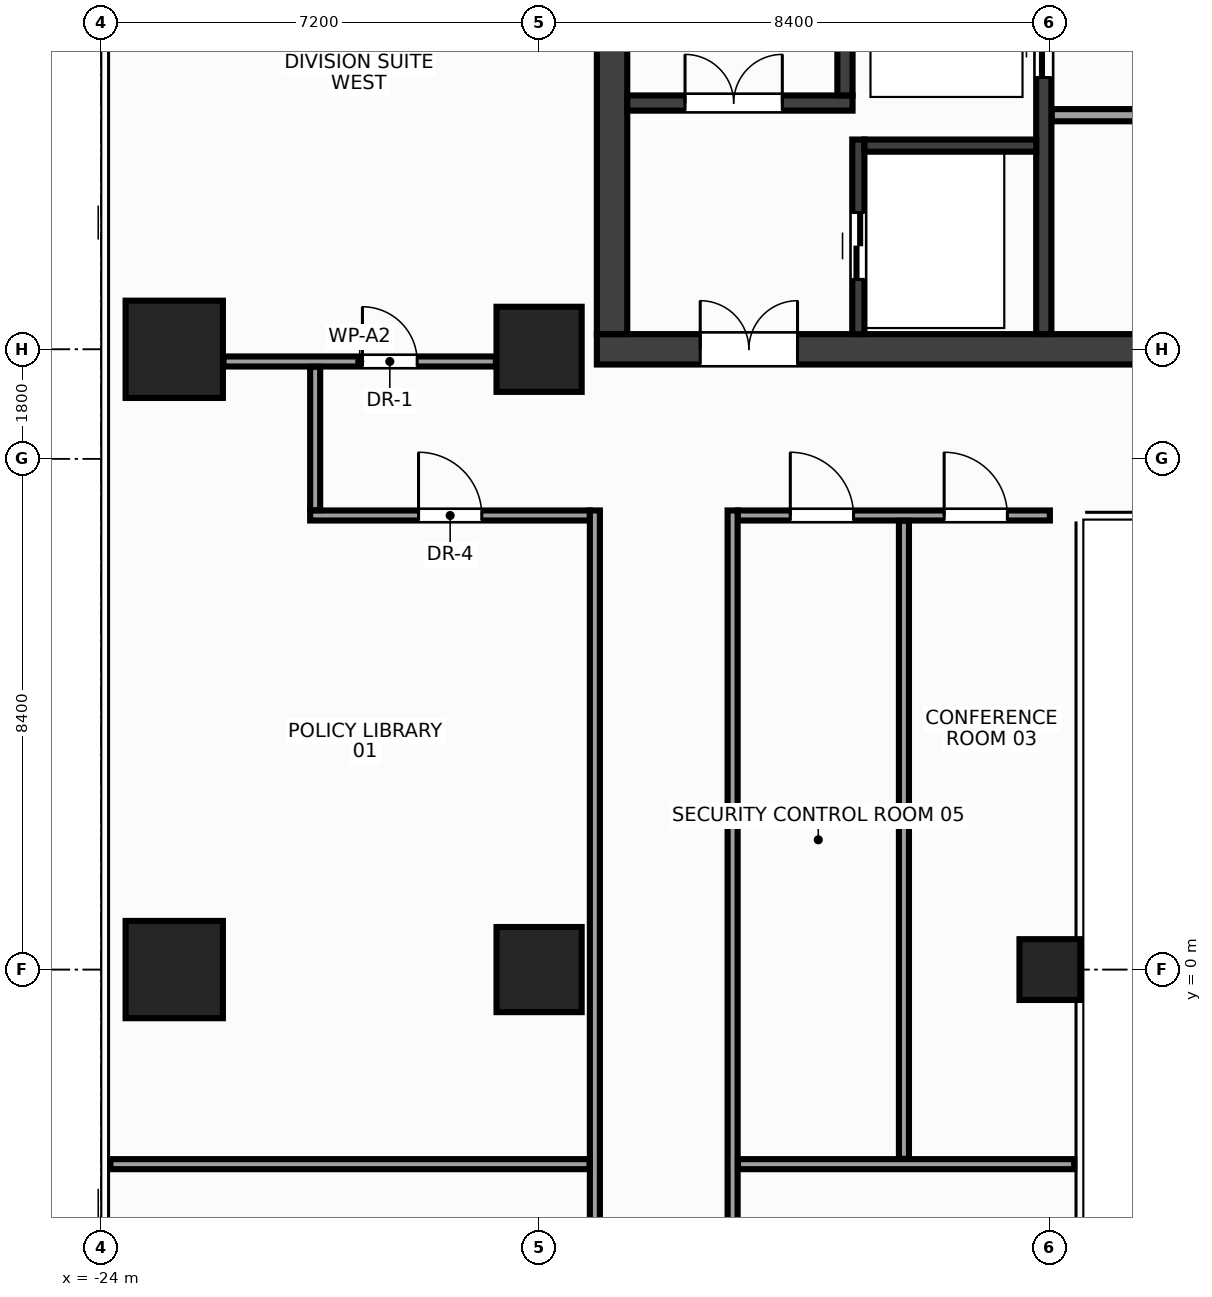
"""IFC4 building model, lengths in metres.
Left out: names, types, materials, properties, quantities, classifications, styles, units other than length and angle.
Written with IfcOpenShell. Run it as: python <this file> out.ifc"""

import sys

from ifc_helpers import new_model, si_unit, direction, frame, frame_2d, origin, origin_2d, place, context, subcontext, project, spatial, rectangle, hollow_rectangle, extrude, source, transform, mapped, element, fill, save


model = new_model("IFC4")
c1 = context("Model", 3, precision=1e-05, world=origin(), true_north=direction((0.0, 1.0)))
c2 = subcontext(c1, "Body", "Model", "MODEL_VIEW")
j1 = project(units=[si_unit("LENGTHUNIT", "METRE"), si_unit("PLANEANGLEUNIT", "RADIAN")], contexts=[c1])
p1 = place(None, origin())
s1 = spatial("IfcSite", under=j1, at=p1, CompositionType="ELEMENT")
p2 = place(p1, origin())
s2 = spatial("IfcBuilding", under=s1, at=p2, CompositionType="ELEMENT")
p3 = place(p2, frame((0.0, 0.0, 221.6)))
s3 = spatial("IfcBuildingStorey", under=s2, at=p3, CompositionType="ELEMENT", Elevation=221.6)
m1 = source(origin(), c2, "Body", "SweptSolid", [
    extrude(rectangle(XDim=31.7, YDim=0.5, at=frame_2d((15.85, 0.0))), origin(), (0.0, 0.0, 1.0), 3.6),
])
p4 = place(p3, frame((-15.85, 10.2, 0.0), z_axis=(0.0, 0.0, 1.0), x_axis=(1.0, 0.0, 0.0)))
e1 = element("IfcWall", 1, at=p4, inside=s3, PredefinedType="SHEAR", context=c2, shape_type="MappedRepresentation", body=[
    mapped(m1, transform((0.0, 0.0, 0.0), x_axis=(1.0, 0.0, 0.0), y_axis=(0.0, 1.0, 0.0), z_axis=(0.0, 0.0, 1.0), scale=1.0)),
])
p5 = place(p4, frame((1.7, 0.0, 0.0)))
e2 = element("IfcOpeningElement", 2, at=p5, cuts=e1, PredefinedType="OPENING", context=c2, shape_type="SweptSolid", body=[
    extrude(rectangle(XDim=1.6, YDim=2.15, at=frame_2d((0.8, 1.075))), frame((0.0, 0.262, 0.0), z_axis=(0.0, -1.0, 0.0), x_axis=(1.0, 0.0, 0.0)), (0.0, 0.0, 1.0), 0.524),
])
p6 = place(p4, frame((28.4, 0.0, 0.0)))
e3 = element("IfcOpeningElement", 3, at=p6, cuts=e1, PredefinedType="OPENING", context=c2, shape_type="SweptSolid", body=[
    extrude(rectangle(XDim=1.6, YDim=2.15, at=frame_2d((0.8, 1.075))), frame((0.0, 0.262, 0.0), z_axis=(0.0, -1.0, 0.0), x_axis=(1.0, 0.0, 0.0)), (0.0, 0.0, 1.0), 0.524),
])
p7 = place(p4, frame((15.1, 0.0, 0.0)))
e4 = element("IfcOpeningElement", 4, at=p7, cuts=e1, PredefinedType="OPENING", context=c2, shape_type="SweptSolid", body=[
    extrude(rectangle(XDim=1.5, YDim=2.2, at=frame_2d((0.75, 1.1))), frame((0.0, 0.262, 0.0), z_axis=(0.0, -1.0, 0.0), x_axis=(1.0, 0.0, 0.0)), (0.0, 0.0, 1.0), 0.524),
])
m2 = source(origin(), c2, "Body", "SweptSolid", [
    extrude(rectangle(XDim=13.1, YDim=0.5, at=frame_2d((6.55, 0.0))), origin(), (0.0, 0.0, 1.0), 3.6),
])
p8 = place(p3, frame((-15.6, 10.45, 0.0), z_axis=(0.0, 0.0, 1.0), x_axis=(0.0, 1.0, 0.0)))
e5 = element("IfcWall", 5, at=p8, inside=s3, PredefinedType="SHEAR", context=c2, shape_type="MappedRepresentation", body=[
    mapped(m2, transform((0.0, 0.0, 0.0), x_axis=(1.0, 0.0, 0.0), y_axis=(0.0, 1.0, 0.0), z_axis=(0.0, 0.0, 1.0), scale=1.0)),
])
m3 = source(origin(), c2, "Body", "SweptSolid", [
    extrude(rectangle(XDim=13.1, YDim=0.25, at=frame_2d((6.55, 0.0))), origin(), (0.0, 0.0, 1.0), 3.6),
])
p9 = place(p3, frame((-8.5, 10.45, 0.0), z_axis=(0.0, 0.0, 1.0), x_axis=(0.0, 1.0, 0.0)))
e6 = element("IfcWall", 6, at=p9, inside=s3, PredefinedType="SHEAR", context=c2, shape_type="MappedRepresentation", body=[
    mapped(m3, transform((0.0, 0.0, 0.0), x_axis=(1.0, 0.0, 0.0), y_axis=(0.0, 1.0, 0.0), z_axis=(0.0, 0.0, 1.0), scale=1.0)),
])
p10 = place(p9, frame((4.22, 0.0, 0.0)))
e7 = element("IfcOpeningElement", 7, at=p10, cuts=e6, PredefinedType="OPENING", context=c2, shape_type="SweptSolid", body=[
    extrude(rectangle(XDim=1.1, YDim=2.15, at=frame_2d((0.55, 1.075))), frame((0.0, 0.137, 0.0), z_axis=(0.0, -1.0, 0.0), x_axis=(1.0, 0.0, 0.0)), (0.0, 0.0, 1.0), 0.274),
])
p11 = place(p9, frame((6.14, 0.0, 0.0)))
e8 = element("IfcOpeningElement", 8, at=p11, cuts=e6, PredefinedType="OPENING", context=c2, shape_type="SweptSolid", body=[
    extrude(rectangle(XDim=1.1, YDim=2.15, at=frame_2d((0.55, 1.075))), frame((0.0, 0.137, 0.0), z_axis=(0.0, -1.0, 0.0), x_axis=(1.0, 0.0, 0.0)), (0.0, 0.0, 1.0), 0.274),
])
p12 = place(p9, frame((8.06, 0.0, 0.0)))
e9 = element("IfcOpeningElement", 9, at=p12, cuts=e6, PredefinedType="OPENING", context=c2, shape_type="SweptSolid", body=[
    extrude(rectangle(XDim=1.1, YDim=2.15, at=frame_2d((0.55, 1.075))), frame((0.0, 0.137, 0.0), z_axis=(0.0, -1.0, 0.0), x_axis=(1.0, 0.0, 0.0)), (0.0, 0.0, 1.0), 0.274),
])
m4 = source(origin(), c2, "Body", "SweptSolid", [
    extrude(rectangle(XDim=3.705, YDim=0.25, at=frame_2d((1.853, 0.0))), origin(), (0.0, 0.0, 1.0), 3.6),
])
p13 = place(p3, frame((-15.35, 14.25, 0.0), z_axis=(0.0, 0.0, 1.0), x_axis=(1.0, 0.0, 0.0)))
e10 = element("IfcWall", 10, at=p13, inside=s3, PredefinedType="SHEAR", context=c2, shape_type="MappedRepresentation", body=[
    mapped(m4, transform((0.0, 0.0, 0.0), x_axis=(1.0, 0.0, 0.0), y_axis=(0.0, 1.0, 0.0), z_axis=(0.0, 0.0, 1.0), scale=1.0)),
])
p14 = place(p13, frame((0.95, 0.0, 0.0)))
e11 = element("IfcOpeningElement", 11, at=p14, cuts=e10, PredefinedType="OPENING", context=c2, shape_type="SweptSolid", body=[
    extrude(rectangle(XDim=1.6, YDim=2.15, at=frame_2d((0.8, 1.075))), frame((0.0, 0.137, 0.0), z_axis=(0.0, -1.0, 0.0), x_axis=(1.0, 0.0, 0.0)), (0.0, 0.0, 1.0), 0.274),
])
m5 = source(origin(), c2, "Body", "SweptSolid", [
    extrude(rectangle(XDim=9.175, YDim=0.25, at=frame_2d((4.587, 0.0))), origin(), (0.0, 0.0, 1.0), 3.6),
])
p15 = place(p3, frame((-11.77, 14.375, 0.0), z_axis=(0.0, 0.0, 1.0), x_axis=(0.0, 1.0, 0.0)))
e12 = element("IfcWall", 12, at=p15, inside=s3, PredefinedType="SHEAR", context=c2, shape_type="MappedRepresentation", body=[
    mapped(m5, transform((0.0, 0.0, 0.0), x_axis=(1.0, 0.0, 0.0), y_axis=(0.0, 1.0, 0.0), z_axis=(0.0, 0.0, 1.0), scale=1.0)),
])
m6 = source(origin(), c2, "Body", "SweptSolid", [
    extrude(rectangle(XDim=3.2, YDim=0.2, at=frame_2d((1.6, 0.0))), origin(), (0.0, 0.0, 1.0), 3.6),
])
p16 = place(p3, frame((-11.55, 10.45, 0.0), z_axis=(0.0, 0.0, 1.0), x_axis=(0.0, 1.0, 0.0)))
e13 = element("IfcWall", 13, at=p16, inside=s3, PredefinedType="SHEAR", context=c2, shape_type="MappedRepresentation", body=[
    mapped(m6, transform((0.0, 0.0, 0.0), x_axis=(1.0, 0.0, 0.0), y_axis=(0.0, 1.0, 0.0), z_axis=(0.0, 0.0, 1.0), scale=1.0)),
])
p17 = place(p16, frame((0.9, 0.0, 0.0)))
e14 = element("IfcOpeningElement", 14, at=p17, cuts=e13, PredefinedType="OPENING", context=c2, shape_type="SweptSolid", body=[
    extrude(rectangle(XDim=1.1, YDim=2.15, at=frame_2d((0.55, 1.075))), frame((0.0, 0.112, 0.0), z_axis=(0.0, -1.0, 0.0), x_axis=(1.0, 0.0, 0.0)), (0.0, 0.0, 1.0), 0.224),
])
m7 = source(origin(), c2, "Body", "SweptSolid", [
    extrude(rectangle(XDim=2.825, YDim=0.2, at=frame_2d((1.413, 0.0))), origin(), (0.0, 0.0, 1.0), 3.6),
])
p18 = place(p3, frame((-11.45, 13.55, 0.0), z_axis=(0.0, 0.0, 1.0), x_axis=(1.0, 0.0, 0.0)))
e15 = element("IfcWall", 15, at=p18, inside=s3, PredefinedType="SHEAR", context=c2, shape_type="MappedRepresentation", body=[
    mapped(m7, transform((0.0, 0.0, 0.0), x_axis=(1.0, 0.0, 0.0), y_axis=(0.0, 1.0, 0.0), z_axis=(0.0, 0.0, 1.0), scale=1.0)),
])
m8 = source(origin(), c2, "Body", "SweptSolid", [
    extrude(rectangle(XDim=1.4, YDim=1.4, at=origin_2d()), origin(), (0.0, 0.0, 1.0), 3.6),
])
for number, where, z_axis, x_axis in (
    (16, (-16.8, 0.0, 0.0), (0.0, 0.0, 1.0), (1.0, 0.0, 0.0)),
    (17, (-16.8, 10.2, 0.0), (0.0, 0.0, 1.0), (1.0, 0.0, 0.0)),
):
    element("IfcColumn", number, at=place(p3, frame(where, z_axis=z_axis, x_axis=x_axis)), inside=s3, PredefinedType="COLUMN", context=c2, shape_type="MappedRepresentation", body=[
        mapped(m8, transform((0.0, 0.0, 0.0), x_axis=(1.0, 0.0, 0.0), y_axis=(0.0, 1.0, 0.0), z_axis=(0.0, 0.0, 1.0), scale=1.0)),
    ])
m9 = source(origin(), c2, "Body", "SweptSolid", [
    extrude(rectangle(XDim=1.6, YDim=1.6, at=origin_2d()), origin(), (0.0, 0.0, 1.0), 3.6),
])
for number, where, z_axis, x_axis in (
    (18, (-22.8, 0.0, 0.0), (0.0, 0.0, 1.0), (1.0, 0.0, 0.0)),
    (19, (-22.8, 10.2, 0.0), (0.0, 0.0, 1.0), (1.0, 0.0, 0.0)),
):
    element("IfcColumn", number, at=place(p3, frame(where, z_axis=z_axis, x_axis=x_axis)), inside=s3, PredefinedType="COLUMN", context=c2, shape_type="MappedRepresentation", body=[
        mapped(m9, transform((0.0, 0.0, 0.0), x_axis=(1.0, 0.0, 0.0), y_axis=(0.0, 1.0, 0.0), z_axis=(0.0, 0.0, 1.0), scale=1.0)),
    ])
m10 = source(origin(), c2, "Body", "SweptSolid", [
    extrude(hollow_rectangle(XDim=1.0, YDim=1.0, WallThickness=0.045, at=origin_2d()), origin(), (0.0, 0.0, 1.0), 3.6),
])
p19 = place(p3, frame((-8.4, 0.0, 0.0), z_axis=(0.0, 0.0, 1.0), x_axis=(1.0, 0.0, 0.0)))
e20 = element("IfcColumn", 20, at=p19, inside=s3, PredefinedType="COLUMN", context=c2, shape_type="MappedRepresentation", body=[
    mapped(m10, transform((0.0, 0.0, 0.0), x_axis=(1.0, 0.0, 0.0), y_axis=(0.0, 1.0, 0.0), z_axis=(0.0, 0.0, 1.0), scale=1.0)),
])
m11 = source(origin(), c2, "Body", "SweptSolid", [
    extrude(rectangle(XDim=7.07, YDim=0.2, at=frame_2d((3.535, 0.0))), origin(), (0.0, 0.0, 1.0), 3.38),
])
p20 = place(p3, frame((-8.37, 14.05, 0.0), z_axis=(0.0, 0.0, 1.0), x_axis=(1.0, 0.0, 0.0)))
e21 = element("IfcWall", 21, at=p20, inside=s3, PredefinedType="PARTITIONING", context=c2, shape_type="MappedRepresentation", body=[
    mapped(m11, transform((0.0, 0.0, 0.0), x_axis=(1.0, 0.0, 0.0), y_axis=(0.0, 1.0, 0.0), z_axis=(0.0, 0.0, 1.0), scale=1.0)),
])
p21 = place(p20, frame((2.8, 0.0, 0.0)))
e22 = element("IfcOpeningElement", 22, at=p21, cuts=e21, PredefinedType="OPENING", context=c2, shape_type="SweptSolid", body=[
    extrude(rectangle(XDim=0.98, YDim=2.15, at=frame_2d((0.49, 1.075))), frame((0.0, 0.112, 0.0), z_axis=(0.0, -1.0, 0.0), x_axis=(1.0, 0.0, 0.0)), (0.0, 0.0, 1.0), 0.224),
])
m12 = source(origin(), c2, "Body", "SweptSolid", [
    extrude(rectangle(XDim=4.48, YDim=0.165, at=frame_2d((2.24, 0.0))), origin(), (0.0, 0.0, 1.0), 2.915),
])
p22 = place(p3, frame((-21.99, 10.0, 0.0), z_axis=(0.0, 0.0, 1.0), x_axis=(1.0, 0.0, 0.0)))
e23 = element("IfcWall", 23, at=p22, inside=s3, PredefinedType="PARTITIONING", context=c2, shape_type="MappedRepresentation", body=[
    mapped(m12, transform((0.0, 0.0, 0.0), x_axis=(1.0, 0.0, 0.0), y_axis=(0.0, 1.0, 0.0), z_axis=(0.0, 0.0, 1.0), scale=1.0)),
])
p23 = place(p22, frame((2.285, 0.0, 0.0)))
e24 = element("IfcOpeningElement", 24, at=p23, cuts=e23, PredefinedType="OPENING", context=c2, shape_type="SweptSolid", body=[
    extrude(rectangle(XDim=0.9, YDim=2.15, at=frame_2d((0.45, 1.075))), frame((0.0, 0.094, 0.0), z_axis=(0.0, -1.0, 0.0), x_axis=(1.0, 0.0, 0.0)), (0.0, 0.0, 1.0), 0.189),
])
m13 = source(origin(), c2, "Body", "SweptSolid", [
    extrude(rectangle(XDim=4.6, YDim=0.165, at=frame_2d((2.3, 0.0))), origin(), (0.0, 0.0, 1.0), 2.765),
])
p24 = place(p3, frame((-20.565, 7.468, 0.0), z_axis=(0.0, 0.0, 1.0), x_axis=(1.0, 0.0, 0.0)))
e25 = element("IfcWall", 25, at=p24, inside=s3, PredefinedType="PARTITIONING", context=c2, shape_type="MappedRepresentation", body=[
    mapped(m13, transform((0.0, 0.0, 0.0), x_axis=(1.0, 0.0, 0.0), y_axis=(0.0, 1.0, 0.0), z_axis=(0.0, 0.0, 1.0), scale=1.0)),
])
p25 = place(p24, frame((1.782, 0.0, 0.0)))
e26 = element("IfcOpeningElement", 26, at=p25, cuts=e25, PredefinedType="OPENING", context=c2, shape_type="SweptSolid", body=[
    extrude(rectangle(XDim=1.04, YDim=2.2, at=frame_2d((0.52, 1.1))), frame((0.0, 0.094, 0.0), z_axis=(0.0, -1.0, 0.0), x_axis=(1.0, 0.0, 0.0)), (0.0, 0.0, 1.0), 0.189),
])
m14 = source(origin(), c2, "Body", "SweptSolid", [
    extrude(rectangle(XDim=5.135, YDim=0.165, at=frame_2d((2.567, 0.0))), origin(), (0.0, 0.0, 1.0), 3.38),
])
p26 = place(p3, frame((-13.535, 7.468, 0.0), z_axis=(0.0, 0.0, 1.0), x_axis=(1.0, 0.0, 0.0)))
e27 = element("IfcWall", 27, at=p26, inside=s3, PredefinedType="PARTITIONING", context=c2, shape_type="MappedRepresentation", body=[
    mapped(m14, transform((0.0, 0.0, 0.0), x_axis=(1.0, 0.0, 0.0), y_axis=(0.0, 1.0, 0.0), z_axis=(0.0, 0.0, 1.0), scale=1.0)),
])
p27 = place(p26, frame((3.396, 0.0, 0.0)))
e28 = element("IfcOpeningElement", 28, at=p27, cuts=e27, PredefinedType="OPENING", context=c2, shape_type="SweptSolid", body=[
    extrude(rectangle(XDim=1.04, YDim=2.2, at=frame_2d((0.52, 1.1))), frame((0.0, 0.094, 0.0), z_axis=(0.0, -1.0, 0.0), x_axis=(1.0, 0.0, 0.0)), (0.0, 0.0, 1.0), 0.189),
])
p28 = place(p26, frame((0.866, 0.0, 0.0)))
e29 = element("IfcOpeningElement", 29, at=p28, cuts=e27, PredefinedType="OPENING", context=c2, shape_type="SweptSolid", body=[
    extrude(rectangle(XDim=1.04, YDim=2.2, at=frame_2d((0.52, 1.1))), frame((0.0, 0.094, 0.0), z_axis=(0.0, -1.0, 0.0), x_axis=(1.0, 0.0, 0.0)), (0.0, 0.0, 1.0), 0.189),
])
m15 = source(origin(), c2, "Body", "SweptSolid", [
    extrude(rectangle(XDim=2.358, YDim=0.165, at=frame_2d((1.179, 0.0))), origin(), (0.0, 0.0, 1.0), 3.38),
])
p29 = place(p3, frame((-20.482, 7.555, 0.0), z_axis=(0.0, 0.0, 1.0), x_axis=(0.0, 1.0, 0.0)))
e30 = element("IfcWall", 30, at=p29, inside=s3, PredefinedType="PARTITIONING", context=c2, shape_type="MappedRepresentation", body=[
    mapped(m15, transform((0.0, 0.0, 0.0), x_axis=(1.0, 0.0, 0.0), y_axis=(0.0, 1.0, 0.0), z_axis=(0.0, 0.0, 1.0), scale=1.0)),
])
m16 = source(origin(), c2, "Body", "SweptSolid", [
    extrude(rectangle(XDim=18.045, YDim=0.165, at=frame_2d((9.022, 0.0))), origin(), (0.0, 0.0, 1.0), 2.915),
])
p30 = place(p3, frame((-15.883, -10.495, 0.0), z_axis=(0.0, 0.0, 1.0), x_axis=(0.0, 1.0, 0.0)))
e31 = element("IfcWall", 31, at=p30, inside=s3, PredefinedType="PARTITIONING", context=c2, shape_type="MappedRepresentation", body=[
    mapped(m16, transform((0.0, 0.0, 0.0), x_axis=(1.0, 0.0, 0.0), y_axis=(0.0, 1.0, 0.0), z_axis=(0.0, 0.0, 1.0), scale=1.0)),
])
p31 = place(p30, frame((3.146, 0.0, 0.0)))
e32 = element("IfcOpeningElement", 32, at=p31, cuts=e31, PredefinedType="OPENING", context=c2, shape_type="SweptSolid", body=[
    extrude(rectangle(XDim=1.04, YDim=2.2, at=frame_2d((0.52, 1.1))), frame((0.0, 0.094, 0.0), z_axis=(0.0, -1.0, 0.0), x_axis=(1.0, 0.0, 0.0)), (0.0, 0.0, 1.0), 0.189),
])
p32 = place(p3, frame((-13.617, -10.495, 0.0), z_axis=(0.0, 0.0, 1.0), x_axis=(0.0, 1.0, 0.0)))
e33 = element("IfcWall", 33, at=p32, inside=s3, PredefinedType="PARTITIONING", context=c2, shape_type="MappedRepresentation", body=[
    mapped(m16, transform((0.0, 0.0, 0.0), x_axis=(1.0, 0.0, 0.0), y_axis=(0.0, 1.0, 0.0), z_axis=(0.0, 0.0, 1.0), scale=1.0)),
])
p33 = place(p32, frame((3.146, 0.0, 0.0)))
e34 = element("IfcOpeningElement", 34, at=p33, cuts=e33, PredefinedType="OPENING", context=c2, shape_type="SweptSolid", body=[
    extrude(rectangle(XDim=1.04, YDim=2.2, at=frame_2d((0.52, 1.1))), frame((0.0, 0.094, 0.0), z_axis=(0.0, -1.0, 0.0), x_axis=(1.0, 0.0, 0.0)), (0.0, 0.0, 1.0), 0.189),
])
m17 = source(origin(), c2, "Body", "SweptSolid", [
    extrude(rectangle(XDim=7.88, YDim=0.165, at=frame_2d((3.94, 0.0))), origin(), (0.0, 0.0, 1.0), 2.765),
])
p34 = place(p3, frame((-23.85, -3.2, 0.0), z_axis=(0.0, 0.0, 1.0), x_axis=(1.0, 0.0, 0.0)))
e35 = element("IfcWall", 35, at=p34, inside=s3, PredefinedType="PARTITIONING", context=c2, shape_type="MappedRepresentation", body=[
    mapped(m17, transform((0.0, 0.0, 0.0), x_axis=(1.0, 0.0, 0.0), y_axis=(0.0, 1.0, 0.0), z_axis=(0.0, 0.0, 1.0), scale=1.0)),
])
m18 = source(origin(), c2, "Body", "SweptSolid", [
    extrude(rectangle(XDim=5.53, YDim=0.165, at=frame_2d((2.765, 0.0))), origin(), (0.0, 0.0, 1.0), 2.765),
])
p35 = place(p3, frame((-13.53, -3.2, 0.0), z_axis=(0.0, 0.0, 1.0), x_axis=(1.0, 0.0, 0.0)))
e36 = element("IfcWall", 36, at=p35, inside=s3, PredefinedType="PARTITIONING", context=c2, shape_type="MappedRepresentation", body=[
    mapped(m18, transform((0.0, 0.0, 0.0), x_axis=(1.0, 0.0, 0.0), y_axis=(0.0, 1.0, 0.0), z_axis=(0.0, 0.0, 1.0), scale=1.0)),
])
m19 = source(origin(), c2, "Body", "SweptSolid", [
    extrude(rectangle(XDim=10.492, YDim=0.165, at=frame_2d((5.246, 0.0))), origin(), (0.0, 0.0, 1.0), 2.915),
])
p36 = place(p3, frame((-10.8, -3.113, 0.0), z_axis=(0.0, 0.0, 1.0), x_axis=(0.0, 1.0, 0.0)))
e37 = element("IfcWall", 37, at=p36, inside=s3, PredefinedType="PARTITIONING", context=c2, shape_type="MappedRepresentation", body=[
    mapped(m19, transform((0.0, 0.0, 0.0), x_axis=(1.0, 0.0, 0.0), y_axis=(0.0, 1.0, 0.0), z_axis=(0.0, 0.0, 1.0), scale=1.0)),
])
m20 = source(origin(), c2, "Body", "SweptSolid", [
    extrude(rectangle(XDim=1.6, YDim=2.15, at=frame_2d((0.8, 1.075))), frame((0.0, 0.025, 0.0), z_axis=(0.0, -1.0, 0.0), x_axis=(1.0, 0.0, 0.0)), (0.0, 0.0, 1.0), 0.05),
])
p37 = place(p14, origin())
e38 = element("IfcDoor", 38, at=p37, inside=s3, OperationType="DOUBLE_DOOR_SINGLE_SWING", PredefinedType="DOOR", context=c2, shape_type="MappedRepresentation", body=[
    mapped(m20, transform((0.0, 0.0, 0.0), x_axis=(1.0, 0.0, 0.0), y_axis=(0.0, 1.0, 0.0), z_axis=(0.0, 0.0, 1.0), scale=1.0)),
])
fill(e11, e38)
p38 = place(p5, origin())
e39 = element("IfcDoor", 39, at=p38, inside=s3, OperationType="DOUBLE_DOOR_SINGLE_SWING", PredefinedType="DOOR", context=c2, shape_type="MappedRepresentation", body=[
    mapped(m20, transform((0.0, 0.0, 0.0), x_axis=(1.0, 0.0, 0.0), y_axis=(0.0, 1.0, 0.0), z_axis=(0.0, 0.0, 1.0), scale=1.0)),
])
fill(e2, e39)
m21 = source(origin(), c2, "Body", "SweptSolid", [
    extrude(rectangle(XDim=1.1, YDim=2.15, at=frame_2d((0.55, 1.075))), frame((0.0, 0.025, 0.0), z_axis=(0.0, -1.0, 0.0), x_axis=(1.0, 0.0, 0.0)), (0.0, 0.0, 1.0), 0.05),
])
p39 = place(p17, origin())
e40 = element("IfcDoor", 40, at=p39, inside=s3, OperationType="DOUBLE_DOOR_SLIDING", PredefinedType="DOOR", context=c2, shape_type="MappedRepresentation", body=[
    mapped(m21, transform((0.0, 0.0, 0.0), x_axis=(1.0, 0.0, 0.0), y_axis=(0.0, 1.0, 0.0), z_axis=(0.0, 0.0, 1.0), scale=1.0)),
])
fill(e14, e40)
p40 = place(p10, origin())
e41 = element("IfcDoor", 41, at=p40, inside=s3, OperationType="DOUBLE_DOOR_SLIDING", PredefinedType="DOOR", context=c2, shape_type="MappedRepresentation", body=[
    mapped(m21, transform((0.0, 0.0, 0.0), x_axis=(1.0, 0.0, 0.0), y_axis=(0.0, 1.0, 0.0), z_axis=(0.0, 0.0, 1.0), scale=1.0)),
])
fill(e7, e41)
m22 = source(origin(), c2, "Body", "SweptSolid", [
    extrude(rectangle(XDim=0.9, YDim=2.15, at=frame_2d((0.45, 1.075))), frame((0.0, 0.025, 0.0), z_axis=(0.0, -1.0, 0.0), x_axis=(1.0, 0.0, 0.0)), (0.0, 0.0, 1.0), 0.05),
])
p41 = place(p23, origin())
e42 = element("IfcDoor", 42, at=p41, inside=s3, OperationType="SINGLE_SWING_LEFT", PredefinedType="DOOR", context=c2, shape_type="MappedRepresentation", body=[
    mapped(m22, transform((0.0, 0.0, 0.0), x_axis=(1.0, 0.0, 0.0), y_axis=(0.0, 1.0, 0.0), z_axis=(0.0, 0.0, 1.0), scale=1.0)),
])
fill(e24, e42)
m23 = source(origin(), c2, "Body", "SweptSolid", [
    extrude(rectangle(XDim=1.04, YDim=2.2, at=frame_2d((0.52, 1.1))), frame((0.0, 0.025, 0.0), z_axis=(0.0, -1.0, 0.0), x_axis=(1.0, 0.0, 0.0)), (0.0, 0.0, 1.0), 0.05),
])
p42 = place(p25, origin())
e43 = element("IfcDoor", 43, at=p42, inside=s3, OperationType="SINGLE_SWING_LEFT", PredefinedType="DOOR", context=c2, shape_type="MappedRepresentation", body=[
    mapped(m23, transform((0.0, 0.0, 0.0), x_axis=(1.0, 0.0, 0.0), y_axis=(0.0, 1.0, 0.0), z_axis=(0.0, 0.0, 1.0), scale=1.0)),
])
fill(e26, e43)
p43 = place(p27, origin())
e44 = element("IfcDoor", 44, at=p43, inside=s3, OperationType="SINGLE_SWING_LEFT", PredefinedType="DOOR", context=c2, shape_type="MappedRepresentation", body=[
    mapped(m23, transform((0.0, 0.0, 0.0), x_axis=(1.0, 0.0, 0.0), y_axis=(0.0, 1.0, 0.0), z_axis=(0.0, 0.0, 1.0), scale=1.0)),
])
fill(e28, e44)
p44 = place(p28, origin())
e45 = element("IfcDoor", 45, at=p44, inside=s3, OperationType="SINGLE_SWING_LEFT", PredefinedType="DOOR", context=c2, shape_type="MappedRepresentation", body=[
    mapped(m23, transform((0.0, 0.0, 0.0), x_axis=(1.0, 0.0, 0.0), y_axis=(0.0, 1.0, 0.0), z_axis=(0.0, 0.0, 1.0), scale=1.0)),
])
fill(e29, e45)
save(model, sys.argv[1])
